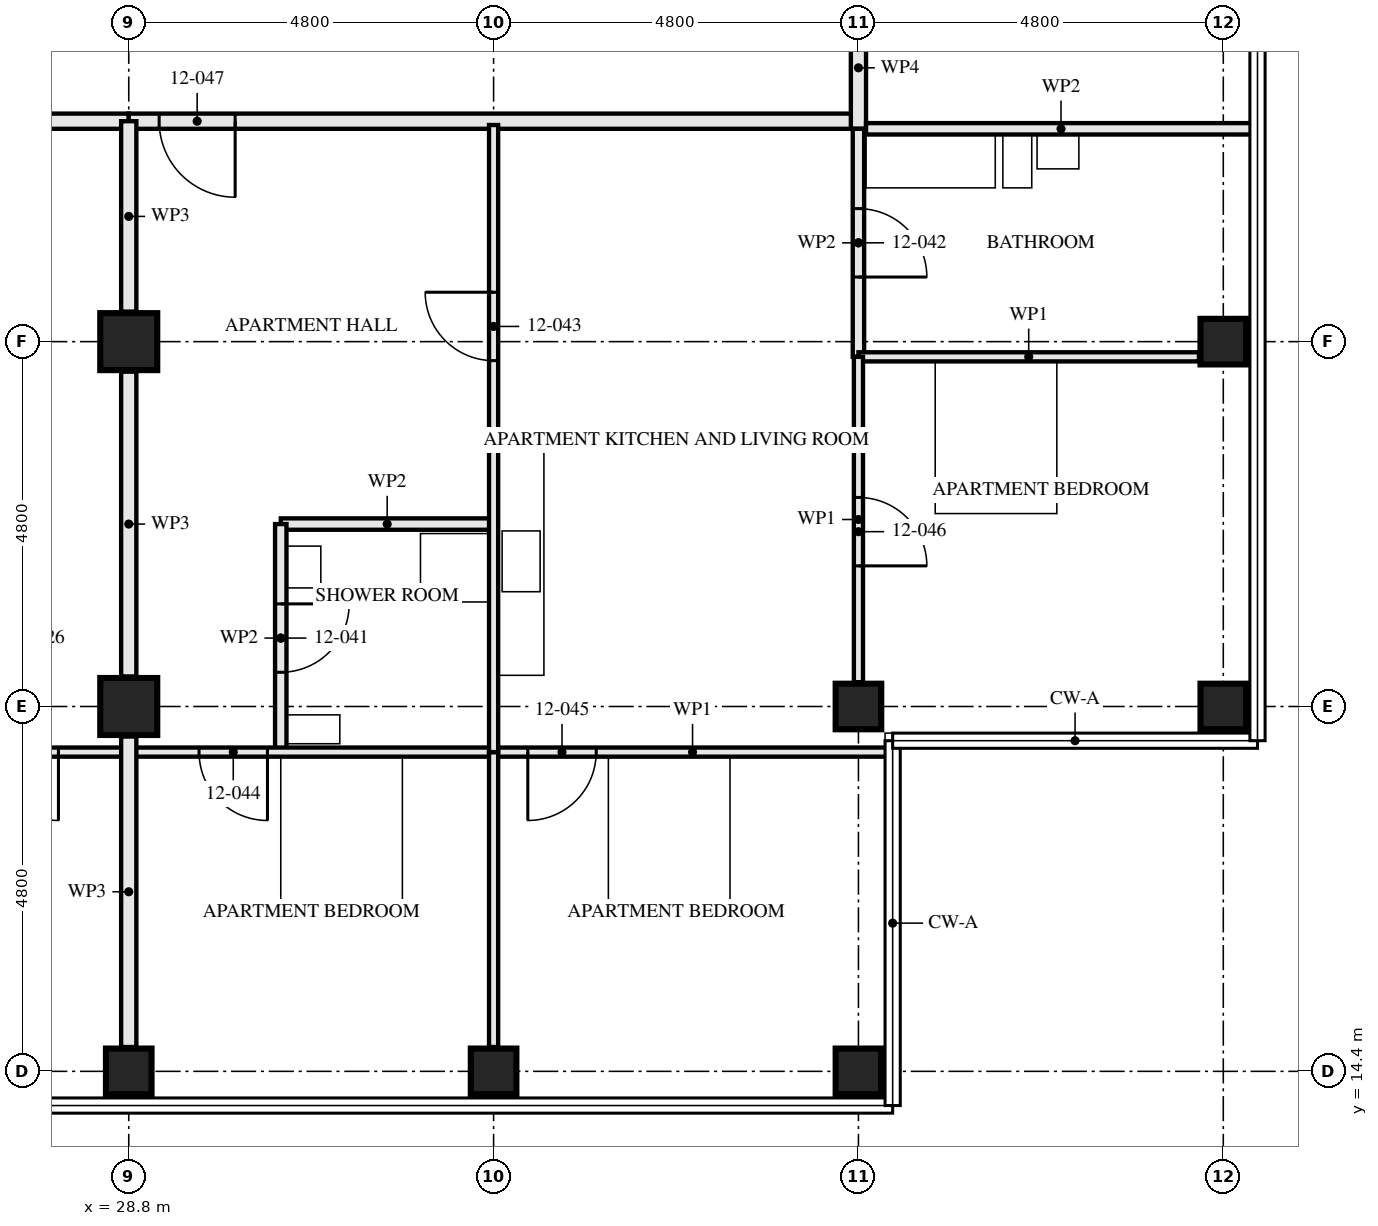
"""IFC4 building model, lengths in metres.
Left out: names, types, materials, properties, quantities, classifications, styles, units other than length and angle.
Written with IfcOpenShell. Run it as: python <this file> out.ifc"""

import sys

from ifc_helpers import new_model, si_unit, direction, frame, frame_2d, origin, origin_2d, place, context, subcontext, project, spatial, rectangle, hollow_rectangle, extrude, element, fill, save


model = new_model("IFC4")
c1 = context("Model", 3, precision=1e-05, world=origin(), true_north=direction((0.0, 1.0)))
c2 = subcontext(c1, "Body", "Model", "MODEL_VIEW")
j1 = project(units=[si_unit("LENGTHUNIT", "METRE"), si_unit("PLANEANGLEUNIT", "RADIAN")], contexts=[c1])
p1 = place(None, origin())
s1 = spatial("IfcSite", under=j1, at=p1, CompositionType="ELEMENT")
p2 = place(p1, origin())
s2 = spatial("IfcBuilding", under=s1, at=p2, CompositionType="ELEMENT")
p3 = place(p2, frame((0.0, 0.0, 48.0)))
s3 = spatial("IfcBuildingStorey", under=s2, at=p3, CompositionType="ELEMENT", Elevation=48.0)
p4 = place(p3, frame((28.8, 14.4, 0.0), z_axis=(0.0, 0.0, 1.0), x_axis=(0.0, 1.0, 0.0)))
e1 = element("IfcColumn", 1, at=p4, inside=s3, PredefinedType="COLUMN", context=c2, shape_type="SweptSolid", body=[
    extrude(hollow_rectangle(XDim=0.6, YDim=0.6, WallThickness=0.08, at=origin_2d()), origin(), (0.0, 0.0, 1.0), 3.5),
])
for number, where, z_axis, x_axis in (
    (2, (28.8, 19.2, 0.0), (0.0, 0.0, 1.0), (1.0, 0.0, 0.0)),
    (3, (28.8, 24.0, 0.0), (0.0, 0.0, 1.0), (1.0, 0.0, 0.0)),
):
    element("IfcColumn", number, at=place(p3, frame(where, z_axis=z_axis, x_axis=x_axis)), inside=s3, PredefinedType="COLUMN", context=c2, shape_type="SweptSolid", body=[
        extrude(hollow_rectangle(XDim=0.75, YDim=0.75, WallThickness=0.08, at=origin_2d()), origin(), (0.0, 0.0, 1.0), 3.5),
    ])
p5 = place(p3, frame((33.6, 14.4, 0.0), z_axis=(0.0, 0.0, 1.0), x_axis=(0.0, 1.0, 0.0)))
e4 = element("IfcColumn", 4, at=p5, inside=s3, PredefinedType="COLUMN", context=c2, shape_type="SweptSolid", body=[
    extrude(hollow_rectangle(XDim=0.6, YDim=0.6, WallThickness=0.08, at=origin_2d()), origin(), (0.0, 0.0, 1.0), 3.5),
])
for number, where, z_axis, x_axis in (
    (5, (38.4, 14.4, 0.0), (0.0, 0.0, 1.0), (0.0, 1.0, 0.0)),
    (6, (38.4, 19.2, 0.0), (0.0, 0.0, 1.0), (0.0, 1.0, 0.0)),
    (7, (43.2, 19.2, 0.0), (0.0, 0.0, 1.0), (0.0, 1.0, 0.0)),
):
    element("IfcColumn", number, at=place(p3, frame(where, z_axis=z_axis, x_axis=x_axis)), inside=s3, PredefinedType="COLUMN", context=c2, shape_type="SweptSolid", body=[
        extrude(hollow_rectangle(XDim=0.6, YDim=0.6, WallThickness=0.06, at=origin_2d()), origin(), (0.0, 0.0, 1.0), 3.5),
    ])
p6 = place(p3, frame((43.2, 24.0, 0.0), z_axis=(0.0, 0.0, 1.0), x_axis=(1.0, 0.0, 0.0)))
e8 = element("IfcColumn", 8, at=p6, inside=s3, PredefinedType="COLUMN", context=c2, shape_type="SweptSolid", body=[
    extrude(hollow_rectangle(XDim=0.6, YDim=0.6, WallThickness=0.08, at=origin_2d()), origin(), (0.0, 0.0, 1.0), 3.5),
])
p7 = place(p3, frame((24.0, 18.6, 0.0), z_axis=(0.0, 0.0, 1.0), x_axis=(1.0, 0.0, 0.0)))
e9 = element("IfcWall", 9, at=p7, inside=s3, PredefinedType="PARTITIONING", context=c2, shape_type="SweptSolid", body=[
    extrude(rectangle(XDim=4.8, YDim=0.12, at=frame_2d((2.4, 0.0))), origin(), (0.0, 0.0, 1.0), 3.33),
])
p8 = place(p7, frame((2.975, 0.0, 0.0)))
e10 = element("IfcOpeningElement", 10, at=p8, cuts=e9, PredefinedType="OPENING", context=c2, shape_type="SweptSolid", body=[
    extrude(rectangle(XDim=0.9, YDim=2.1, at=frame_2d((0.45, 1.05))), frame((0.0, 0.071, 0.0), z_axis=(0.0, -1.0, 0.0), x_axis=(1.0, 0.0, 0.0)), (0.0, 0.0, 1.0), 0.141),
])
p9 = place(p3, frame((14.4, 26.9, 0.0), z_axis=(0.0, 0.0, 1.0), x_axis=(1.0, 0.0, 0.0)))
e11 = element("IfcWall", 11, at=p9, inside=s3, PredefinedType="PARTITIONING", context=c2, shape_type="SweptSolid", body=[
    extrude(rectangle(XDim=14.4, YDim=0.2, at=frame_2d((7.2, 0.0))), origin(), (0.0, 0.0, 1.0), 2.55),
])
p10 = place(p9, frame((1.4, 0.0, 0.0)))
e12 = element("IfcOpeningElement", 12, at=p10, cuts=e11, PredefinedType="OPENING", context=c2, shape_type="SweptSolid", body=[
    extrude(rectangle(XDim=1.0, YDim=2.1, at=frame_2d((0.5, 1.05))), frame((0.0, 0.111, 0.0), z_axis=(0.0, -1.0, 0.0), x_axis=(1.0, 0.0, 0.0)), (0.0, 0.0, 1.0), 0.221),
])
p11 = place(p9, frame((3.65, 0.0, 0.0)))
e13 = element("IfcOpeningElement", 13, at=p11, cuts=e11, PredefinedType="OPENING", context=c2, shape_type="SweptSolid", body=[
    extrude(rectangle(XDim=0.9, YDim=2.1, at=frame_2d((0.45, 1.05))), frame((0.0, 0.111, 0.0), z_axis=(0.0, -1.0, 0.0), x_axis=(1.0, 0.0, 0.0)), (0.0, 0.0, 1.0), 0.221),
])
p12 = place(p9, frame((5.2, 0.0, 0.0)))
e14 = element("IfcOpeningElement", 14, at=p12, cuts=e11, PredefinedType="OPENING", context=c2, shape_type="SweptSolid", body=[
    extrude(rectangle(XDim=1.0, YDim=2.1, at=frame_2d((0.5, 1.05))), frame((0.0, 0.111, 0.0), z_axis=(0.0, -1.0, 0.0), x_axis=(1.0, 0.0, 0.0)), (0.0, 0.0, 1.0), 0.221),
])
p13 = place(p9, frame((10.0, 0.0, 0.0)))
e15 = element("IfcOpeningElement", 15, at=p13, cuts=e11, PredefinedType="OPENING", context=c2, shape_type="SweptSolid", body=[
    extrude(rectangle(XDim=1.0, YDim=2.1, at=frame_2d((0.5, 1.05))), frame((0.0, 0.111, 0.0), z_axis=(0.0, -1.0, 0.0), x_axis=(1.0, 0.0, 0.0)), (0.0, 0.0, 1.0), 0.221),
])
p14 = place(p3, frame((30.8, 18.6, 0.0), z_axis=(0.0, 0.0, 1.0), x_axis=(0.0, 1.0, 0.0)))
e16 = element("IfcWall", 16, at=p14, inside=s3, PredefinedType="PARTITIONING", context=c2, shape_type="SweptSolid", body=[
    extrude(rectangle(XDim=3.0, YDim=0.15, at=frame_2d((1.5, 0.0))), origin(), (0.0, 0.0, 1.0), 2.55),
])
p15 = place(p14, frame((1.05, 0.0, 0.0)))
e17 = element("IfcOpeningElement", 17, at=p15, cuts=e16, PredefinedType="OPENING", context=c2, shape_type="SweptSolid", body=[
    extrude(rectangle(XDim=0.9, YDim=2.1, at=frame_2d((0.45, 1.05))), frame((0.0, 0.085, 0.0), z_axis=(0.0, -1.0, 0.0), x_axis=(1.0, 0.0, 0.0)), (0.0, 0.0, 1.0), 0.171),
])
p16 = place(p3, frame((30.8, 21.6, 0.0), z_axis=(0.0, 0.0, 1.0), x_axis=(1.0, 0.0, 0.0)))
e18 = element("IfcWall", 18, at=p16, inside=s3, PredefinedType="PARTITIONING", context=c2, shape_type="SweptSolid", body=[
    extrude(rectangle(XDim=2.8, YDim=0.15, at=frame_2d((1.4, 0.0))), origin(), (0.0, 0.0, 1.0), 3.33),
])
p17 = place(p3, frame((38.4, 23.8, 0.0), z_axis=(0.0, 0.0, 1.0), x_axis=(0.0, 1.0, 0.0)))
e19 = element("IfcWall", 19, at=p17, inside=s3, PredefinedType="PARTITIONING", context=c2, shape_type="SweptSolid", body=[
    extrude(rectangle(XDim=3.0, YDim=0.15, at=frame_2d((1.5, 0.0))), origin(), (0.0, 0.0, 1.0), 2.55),
])
p18 = place(p17, frame((1.05, 0.0, 0.0)))
e20 = element("IfcOpeningElement", 20, at=p18, cuts=e19, PredefinedType="OPENING", context=c2, shape_type="SweptSolid", body=[
    extrude(rectangle(XDim=0.9, YDim=2.1, at=frame_2d((0.45, 1.05))), frame((0.0, 0.085, 0.0), z_axis=(0.0, -1.0, 0.0), x_axis=(1.0, 0.0, 0.0)), (0.0, 0.0, 1.0), 0.171),
])
p19 = place(p3, frame((33.6, 18.6, 0.0), z_axis=(0.0, 0.0, 1.0), x_axis=(0.0, 1.0, 0.0)))
e21 = element("IfcWall", 21, at=p19, inside=s3, PredefinedType="PARTITIONING", context=c2, shape_type="SweptSolid", body=[
    extrude(rectangle(XDim=8.25, YDim=0.12, at=frame_2d((4.125, 0.0))), origin(), (0.0, 0.0, 1.0), 2.55),
])
p20 = place(p19, frame((5.15, 0.0, 0.0)))
e22 = element("IfcOpeningElement", 22, at=p20, cuts=e21, PredefinedType="OPENING", context=c2, shape_type="SweptSolid", body=[
    extrude(rectangle(XDim=0.9, YDim=2.1, at=frame_2d((0.45, 1.05))), frame((0.0, 0.071, 0.0), z_axis=(0.0, -1.0, 0.0), x_axis=(1.0, 0.0, 0.0)), (0.0, 0.0, 1.0), 0.141),
])
p21 = place(p3, frame((28.8, 18.6, 0.0), z_axis=(0.0, 0.0, 1.0), x_axis=(1.0, 0.0, 0.0)))
e23 = element("IfcWall", 23, at=p21, inside=s3, PredefinedType="PARTITIONING", context=c2, shape_type="SweptSolid", body=[
    extrude(rectangle(XDim=4.8, YDim=0.12, at=frame_2d((2.4, 0.0))), origin(), (0.0, 0.0, 1.0), 3.33),
])
p22 = place(p21, frame((0.925, 0.0, 0.0)))
e24 = element("IfcOpeningElement", 24, at=p22, cuts=e23, PredefinedType="OPENING", context=c2, shape_type="SweptSolid", body=[
    extrude(rectangle(XDim=0.9, YDim=2.1, at=frame_2d((0.45, 1.05))), frame((0.0, 0.071, 0.0), z_axis=(0.0, -1.0, 0.0), x_axis=(1.0, 0.0, 0.0)), (0.0, 0.0, 1.0), 0.141),
])
p23 = place(p3, frame((33.6, 18.6, 0.0), z_axis=(0.0, 0.0, 1.0), x_axis=(1.0, 0.0, 0.0)))
e25 = element("IfcWall", 25, at=p23, inside=s3, PredefinedType="PARTITIONING", context=c2, shape_type="SweptSolid", body=[
    extrude(rectangle(XDim=5.235, YDim=0.12, at=frame_2d((2.617, 0.0))), origin(), (0.0, 0.0, 1.0), 2.32),
])
p24 = place(p23, frame((0.45, 0.0, 0.0)))
e26 = element("IfcOpeningElement", 26, at=p24, cuts=e25, PredefinedType="OPENING", context=c2, shape_type="SweptSolid", body=[
    extrude(rectangle(XDim=0.9, YDim=2.1, at=frame_2d((0.45, 1.05))), frame((0.0, 0.071, 0.0), z_axis=(0.0, -1.0, 0.0), x_axis=(1.0, 0.0, 0.0)), (0.0, 0.0, 1.0), 0.141),
])
p25 = place(p3, frame((38.4, 23.8, 0.0), z_axis=(0.0, 0.0, 1.0), x_axis=(1.0, 0.0, 0.0)))
e27 = element("IfcWall", 27, at=p25, inside=s3, PredefinedType="PARTITIONING", context=c2, shape_type="SweptSolid", body=[
    extrude(rectangle(XDim=4.48, YDim=0.12, at=frame_2d((2.24, 0.0))), origin(), (0.0, 0.0, 1.0), 3.33),
])
p26 = place(p3, frame((33.6, 14.72, 0.0), z_axis=(0.0, 0.0, 1.0), x_axis=(0.0, 1.0, 0.0)))
e28 = element("IfcWall", 28, at=p26, inside=s3, PredefinedType="PARTITIONING", context=c2, shape_type="SweptSolid", body=[
    extrude(rectangle(XDim=3.88, YDim=0.12, at=frame_2d((1.94, 0.0))), origin(), (0.0, 0.0, 1.0), 3.33),
])
p27 = place(p3, frame((38.4, 19.52, 0.0), z_axis=(0.0, 0.0, 1.0), x_axis=(0.0, 1.0, 0.0)))
e29 = element("IfcWall", 29, at=p27, inside=s3, PredefinedType="PARTITIONING", context=c2, shape_type="SweptSolid", body=[
    extrude(rectangle(XDim=4.28, YDim=0.12, at=frame_2d((2.14, 0.0))), origin(), (0.0, 0.0, 1.0), 3.33),
])
p28 = place(p27, frame((1.53, 0.0, 0.0)))
e30 = element("IfcOpeningElement", 30, at=p28, cuts=e29, PredefinedType="OPENING", context=c2, shape_type="SweptSolid", body=[
    extrude(rectangle(XDim=0.9, YDim=2.1, at=frame_2d((0.45, 1.05))), frame((0.0, 0.071, 0.0), z_axis=(0.0, -1.0, 0.0), x_axis=(1.0, 0.0, 0.0)), (0.0, 0.0, 1.0), 0.141),
])
p29 = place(p3, frame((28.8, 26.9, 0.0), z_axis=(0.0, 0.0, 1.0), x_axis=(1.0, 0.0, 0.0)))
e31 = element("IfcWall", 31, at=p29, inside=s3, PredefinedType="PARTITIONING", context=c2, shape_type="SweptSolid", body=[
    extrude(rectangle(XDim=9.6, YDim=0.2, at=frame_2d((4.8, 0.0))), origin(), (0.0, 0.0, 1.0), 3.33),
])
p30 = place(p29, frame((0.4, 0.0, 0.0)))
e32 = element("IfcOpeningElement", 32, at=p30, cuts=e31, PredefinedType="OPENING", context=c2, shape_type="SweptSolid", body=[
    extrude(rectangle(XDim=1.0, YDim=2.1, at=frame_2d((0.5, 1.05))), frame((0.0, 0.111, 0.0), z_axis=(0.0, -1.0, 0.0), x_axis=(1.0, 0.0, 0.0)), (0.0, 0.0, 1.0), 0.221),
])
p31 = place(p3, frame((38.4, 26.8, 0.0), z_axis=(0.0, 0.0, 1.0), x_axis=(0.0, 1.0, 0.0)))
e33 = element("IfcWall", 33, at=p31, inside=s3, PredefinedType="PARTITIONING", context=c2, shape_type="SweptSolid", body=[
    extrude(rectangle(XDim=1.605, YDim=0.2, at=frame_2d((0.802, 0.0))), origin(), (0.0, 0.0, 1.0), 3.33),
])
p32 = place(p3, frame((28.8, 14.72, 0.0), z_axis=(0.0, 0.0, 1.0), x_axis=(0.0, 1.0, 0.0)))
e34 = element("IfcWall", 34, at=p32, inside=s3, PredefinedType="PARTITIONING", context=c2, shape_type="SweptSolid", body=[
    extrude(rectangle(XDim=4.085, YDim=0.2, at=frame_2d((2.042, 0.0))), origin(), (0.0, 0.0, 1.0), 2.32),
])
p33 = place(p3, frame((28.8, 19.595, 0.0), z_axis=(0.0, 0.0, 1.0), x_axis=(0.0, 1.0, 0.0)))
e35 = element("IfcWall", 35, at=p33, inside=s3, PredefinedType="PARTITIONING", context=c2, shape_type="SweptSolid", body=[
    extrude(rectangle(XDim=4.01, YDim=0.2, at=frame_2d((2.005, 0.0))), origin(), (0.0, 0.0, 1.0), 2.32),
])
p34 = place(p3, frame((28.8, 24.395, 0.0), z_axis=(0.0, 0.0, 1.0), x_axis=(0.0, 1.0, 0.0)))
e36 = element("IfcWall", 36, at=p34, inside=s3, PredefinedType="PARTITIONING", context=c2, shape_type="SweptSolid", body=[
    extrude(rectangle(XDim=2.505, YDim=0.2, at=frame_2d((1.252, 0.0))), origin(), (0.0, 0.0, 1.0), 2.32),
])
p35 = place(p3, frame((38.5, 26.8, 0.0), z_axis=(0.0, 0.0, 1.0), x_axis=(1.0, 0.0, 0.0)))
e37 = element("IfcWall", 37, at=p35, inside=s3, PredefinedType="PARTITIONING", context=c2, shape_type="SweptSolid", body=[
    extrude(rectangle(XDim=5.13, YDim=0.15, at=frame_2d((2.565, 0.0))), origin(), (0.0, 0.0, 1.0), 2.32),
])
p36 = place(p8, frame((0.9, 0.0, 0.0), z_axis=(0.0, 0.0, 1.0), x_axis=(-1.0, 0.0, 0.0)))
e38 = element("IfcDoor", 38, at=p36, inside=s3, OperationType="SINGLE_SWING_RIGHT", PredefinedType="DOOR", context=c2, shape_type="SweptSolid", body=[
    extrude(rectangle(XDim=0.9, YDim=2.1, at=frame_2d((0.45, 1.05))), frame((0.0, 0.022, 0.0), z_axis=(0.0, -1.0, 0.0), x_axis=(1.0, 0.0, 0.0)), (0.0, 0.0, 1.0), 0.044),
])
fill(e10, e38)
p37 = place(p15, frame((0.9, 0.0, 0.0), z_axis=(0.0, 0.0, 1.0), x_axis=(-1.0, 0.0, 0.0)))
e39 = element("IfcDoor", 39, at=p37, inside=s3, OperationType="SINGLE_SWING_RIGHT", PredefinedType="DOOR", context=c2, shape_type="SweptSolid", body=[
    extrude(rectangle(XDim=0.9, YDim=2.1, at=frame_2d((0.45, 1.05))), frame((0.0, 0.022, 0.0), z_axis=(0.0, -1.0, 0.0), x_axis=(1.0, 0.0, 0.0)), (0.0, 0.0, 1.0), 0.044),
])
fill(e17, e39)
p38 = place(p18, frame((0.9, 0.0, 0.0), z_axis=(0.0, 0.0, 1.0), x_axis=(-1.0, 0.0, 0.0)))
e40 = element("IfcDoor", 40, at=p38, inside=s3, OperationType="SINGLE_SWING_LEFT", PredefinedType="DOOR", context=c2, shape_type="SweptSolid", body=[
    extrude(rectangle(XDim=0.9, YDim=2.1, at=frame_2d((0.45, 1.05))), frame((0.0, 0.022, 0.0), z_axis=(0.0, -1.0, 0.0), x_axis=(1.0, 0.0, 0.0)), (0.0, 0.0, 1.0), 0.044),
])
fill(e20, e40)
p39 = place(p20, origin())
e41 = element("IfcDoor", 41, at=p39, inside=s3, OperationType="SINGLE_SWING_LEFT", PredefinedType="DOOR", context=c2, shape_type="SweptSolid", body=[
    extrude(rectangle(XDim=0.9, YDim=2.1, at=frame_2d((0.45, 1.05))), frame((0.0, 0.022, 0.0), z_axis=(0.0, -1.0, 0.0), x_axis=(1.0, 0.0, 0.0)), (0.0, 0.0, 1.0), 0.044),
])
fill(e22, e41)
p40 = place(p22, frame((0.9, 0.0, 0.0), z_axis=(0.0, 0.0, 1.0), x_axis=(-1.0, 0.0, 0.0)))
e42 = element("IfcDoor", 42, at=p40, inside=s3, OperationType="SINGLE_SWING_RIGHT", PredefinedType="DOOR", context=c2, shape_type="SweptSolid", body=[
    extrude(rectangle(XDim=0.9, YDim=2.1, at=frame_2d((0.45, 1.05))), frame((0.0, 0.022, 0.0), z_axis=(0.0, -1.0, 0.0), x_axis=(1.0, 0.0, 0.0)), (0.0, 0.0, 1.0), 0.044),
])
fill(e24, e42)
p41 = place(p24, frame((0.9, 0.0, 0.0), z_axis=(0.0, 0.0, 1.0), x_axis=(-1.0, 0.0, 0.0)))
e43 = element("IfcDoor", 43, at=p41, inside=s3, OperationType="SINGLE_SWING_LEFT", PredefinedType="DOOR", context=c2, shape_type="SweptSolid", body=[
    extrude(rectangle(XDim=0.9, YDim=2.1, at=frame_2d((0.45, 1.05))), frame((0.0, 0.022, 0.0), z_axis=(0.0, -1.0, 0.0), x_axis=(1.0, 0.0, 0.0)), (0.0, 0.0, 1.0), 0.044),
])
fill(e26, e43)
p42 = place(p28, frame((0.9, 0.0, 0.0), z_axis=(0.0, 0.0, 1.0), x_axis=(-1.0, 0.0, 0.0)))
e44 = element("IfcDoor", 44, at=p42, inside=s3, OperationType="SINGLE_SWING_LEFT", PredefinedType="DOOR", context=c2, shape_type="SweptSolid", body=[
    extrude(rectangle(XDim=0.9, YDim=2.1, at=frame_2d((0.45, 1.05))), frame((0.0, 0.022, 0.0), z_axis=(0.0, -1.0, 0.0), x_axis=(1.0, 0.0, 0.0)), (0.0, 0.0, 1.0), 0.044),
])
fill(e30, e44)
p43 = place(p30, frame((1.0, 0.0, 0.0), z_axis=(0.0, 0.0, 1.0), x_axis=(-1.0, 0.0, 0.0)))
e45 = element("IfcDoor", 45, at=p43, inside=s3, OperationType="SINGLE_SWING_RIGHT", PredefinedType="DOOR", context=c2, shape_type="SweptSolid", body=[
    extrude(rectangle(XDim=1.0, YDim=2.1, at=frame_2d((0.5, 1.05))), frame((0.0, 0.027, 0.0), z_axis=(0.0, -1.0, 0.0), x_axis=(1.0, 0.0, 0.0)), (0.0, 0.0, 1.0), 0.054),
])
fill(e32, e45)
save(model, sys.argv[1])
